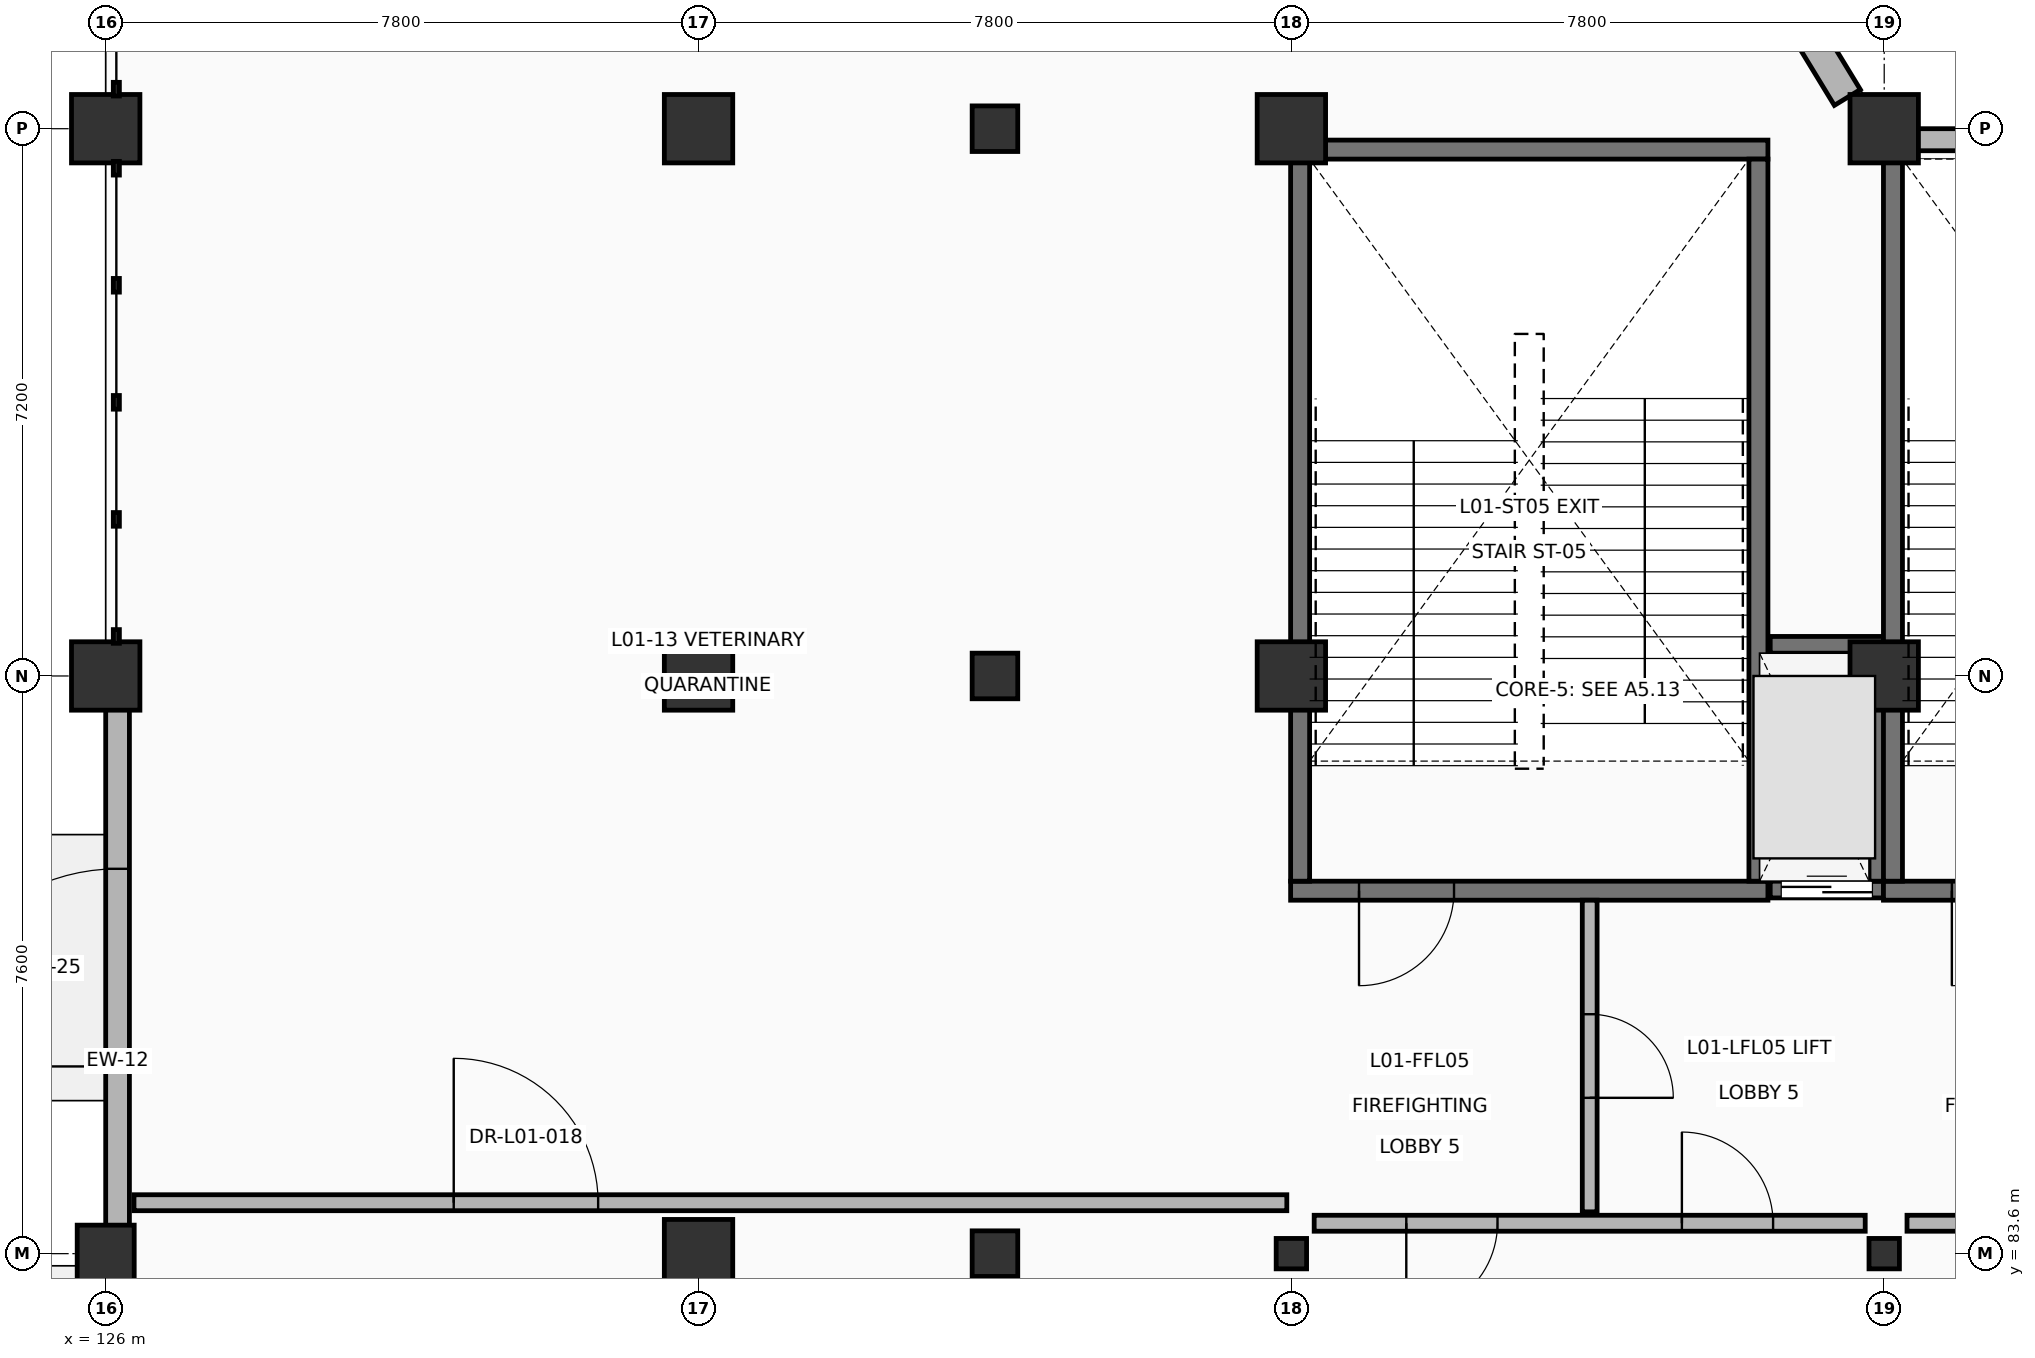
"""IFC4 building model, lengths in metres.
Left out: names, types, materials, properties, quantities, classifications, styles, units other than length and angle.
Written with IfcOpenShell. Run it as: python <this file> out.ifc"""

import sys

from ifc_helpers import new_model, si_unit, direction, frame, frame_2d, origin, origin_2d, place, context, subcontext, project, spatial, rectangle, hollow_rectangle, circle, extrude, element, fill, save


model = new_model("IFC4")
c1 = context("Model", 3, precision=1e-05, world=origin(), true_north=direction((0.0, 1.0)))
c2 = subcontext(c1, "Body", "Model", "MODEL_VIEW")
j1 = project(units=[si_unit("LENGTHUNIT", "METRE"), si_unit("PLANEANGLEUNIT", "RADIAN")], contexts=[c1])
p1 = place(None, origin())
s1 = spatial("IfcSite", under=j1, at=p1, CompositionType="ELEMENT")
p2 = place(p1, origin())
s2 = spatial("IfcBuilding", under=s1, at=p2, CompositionType="ELEMENT")
p3 = place(p2, origin())
s3 = spatial("IfcBuildingStorey", under=s2, at=p3, CompositionType="ELEMENT", Elevation=0.0)
p4 = place(p3, frame((126.0, 83.6, 0.0), z_axis=(0.0, 0.0, 1.0), x_axis=(1.0, 0.0, 0.0)))
e1 = element("IfcColumn", 1, at=p4, inside=s3, PredefinedType="COLUMN", context=c2, shape_type="SweptSolid", body=[
    extrude(circle(Radius=0.375, at=origin_2d()), origin(), (0.0, 0.0, 1.0), 5.1),
])
for number, where, z_axis, x_axis in (
    (2, (126.0, 91.2, 0.0), (0.0, 0.0, 1.0), (1.0, 0.0, 0.0)),
    (3, (126.0, 98.4, 0.0), (0.0, 0.0, 1.0), (1.0, 0.0, 0.0)),
):
    element("IfcColumn", number, at=place(p3, frame(where, z_axis=z_axis, x_axis=x_axis)), inside=s3, PredefinedType="COLUMN", context=c2, shape_type="SweptSolid", body=[
        extrude(rectangle(XDim=0.9, YDim=0.9, at=origin_2d()), origin(), (0.0, 0.0, 1.0), 5.1),
    ])
for number, where, z_axis, x_axis in (
    (4, (133.8, 83.6, 0.0), (0.0, 0.0, 1.0), (1.0, 0.0, 0.0)),
    (5, (133.8, 91.2, 0.0), (0.0, 0.0, 1.0), (1.0, 0.0, 0.0)),
    (6, (133.8, 98.4, 0.0), (0.0, 0.0, 1.0), (1.0, 0.0, 0.0)),
):
    element("IfcColumn", number, at=place(p3, frame(where, z_axis=z_axis, x_axis=x_axis)), inside=s3, PredefinedType="COLUMN", context=c2, shape_type="SweptSolid", body=[
        extrude(rectangle(XDim=0.9, YDim=0.9, at=origin_2d()), origin(), (0.0, 0.0, 1.0), 5.4),
    ])
p5 = place(p3, frame((141.6, 83.6, 0.0), z_axis=(0.0, 0.0, 1.0), x_axis=(1.0, 0.0, 0.0)))
e7 = element("IfcColumn", 7, at=p5, inside=s3, PredefinedType="COLUMN", context=c2, shape_type="SweptSolid", body=[
    extrude(hollow_rectangle(XDim=0.4, YDim=0.4, WallThickness=0.016, at=origin_2d()), origin(), (0.0, 0.0, 1.0), 5.4),
])
for number, where, z_axis, x_axis in (
    (8, (141.6, 91.2, 0.0), (0.0, 0.0, 1.0), (1.0, 0.0, 0.0)),
    (9, (141.6, 98.4, 0.0), (0.0, 0.0, 1.0), (1.0, 0.0, 0.0)),
):
    element("IfcColumn", number, at=place(p3, frame(where, z_axis=z_axis, x_axis=x_axis)), inside=s3, PredefinedType="COLUMN", context=c2, shape_type="SweptSolid", body=[
        extrude(rectangle(XDim=0.9, YDim=0.9, at=origin_2d()), origin(), (0.0, 0.0, 1.0), 5.4),
    ])
p6 = place(p3, frame((149.4, 83.6, 0.0), z_axis=(0.0, 0.0, 1.0), x_axis=(1.0, 0.0, 0.0)))
e10 = element("IfcColumn", 10, at=p6, inside=s3, PredefinedType="COLUMN", context=c2, shape_type="SweptSolid", body=[
    extrude(hollow_rectangle(XDim=0.4, YDim=0.4, WallThickness=0.016, at=origin_2d()), origin(), (0.0, 0.0, 1.0), 5.4),
])
for number, where, z_axis, x_axis in (
    (11, (149.4, 91.2, 0.0), (0.0, 0.0, 1.0), (1.0, 0.0, 0.0)),
    (12, (149.4, 98.4, 0.0), (0.0, 0.0, 1.0), (1.0, 0.0, 0.0)),
):
    element("IfcColumn", number, at=place(p3, frame(where, z_axis=z_axis, x_axis=x_axis)), inside=s3, PredefinedType="COLUMN", context=c2, shape_type="SweptSolid", body=[
        extrude(rectangle(XDim=0.9, YDim=0.9, at=origin_2d()), origin(), (0.0, 0.0, 1.0), 5.4),
    ])
for number, where, z_axis, x_axis in (
    (13, (137.7, 83.6, 0.0), (0.0, 0.0, 1.0), (1.0, 0.0, 0.0)),
    (14, (137.7, 91.2, 0.0), (0.0, 0.0, 1.0), (1.0, 0.0, 0.0)),
    (15, (137.7, 98.4, 0.0), (0.0, 0.0, 1.0), (1.0, 0.0, 0.0)),
):
    element("IfcColumn", number, at=place(p3, frame(where, z_axis=z_axis, x_axis=x_axis)), inside=s3, PredefinedType="COLUMN", context=c2, shape_type="SweptSolid", body=[
        extrude(rectangle(XDim=0.6, YDim=0.6, at=origin_2d()), origin(), (0.0, 0.0, 1.0), 5.4),
    ])
p7 = place(p3, frame((149.835, 98.255, 0.0), z_axis=(0.0, 0.0, 1.0), x_axis=(1.0, 0.0, 0.0)))
e16 = element("IfcWall", 16, at=p7, inside=s3, PredefinedType="SOLIDWALL", context=c2, shape_type="SweptSolid", body=[
    extrude(rectangle(XDim=6.93, YDim=0.29, at=frame_2d((3.465, 0.0))), origin(), (0.0, 0.0, 1.0), 4.325),
])
p8 = place(p3, frame((126.156, 83.96, 0.0), z_axis=(0.0, 0.0, 1.0), x_axis=(0.0, 1.0, 0.0)))
e17 = element("IfcWall", 17, at=p8, inside=s3, PredefinedType="SOLIDWALL", context=c2, shape_type="SweptSolid", body=[
    extrude(rectangle(XDim=6.805, YDim=0.312, at=frame_2d((3.402, 0.0))), origin(), (0.0, 0.0, 1.0), 4.402),
])
p9 = place(p8, frame((2.103, 0.0, 0.0)))
e18 = element("IfcOpeningElement", 18, at=p9, cuts=e17, PredefinedType="OPENING", context=c2, shape_type="SweptSolid", body=[
    extrude(rectangle(XDim=2.6, YDim=2.6, at=frame_2d((1.3, 1.3))), frame((0.0, 0.166, 0.0), z_axis=(0.0, -1.0, 0.0), x_axis=(1.0, 0.0, 0.0)), (0.0, 0.0, 1.0), 0.332),
])
p10 = place(p3, frame((145.319, 104.713, 0.0), z_axis=(0.0, 0.0, 1.0), x_axis=(0.520317846081, -0.853972680505, 0.0)))
e19 = element("IfcWall", 19, at=p10, inside=s3, PredefinedType="SOLIDWALL", context=c2, shape_type="SweptSolid", body=[
    extrude(rectangle(XDim=6.911, YDim=0.4, at=frame_2d((3.456, 0.0))), origin(), (0.0, 0.0, 1.0), 5.1),
])
p11 = place(p3, frame((141.59, 88.375, 0.0), z_axis=(0.0, 0.0, 1.0), x_axis=(1.0, 0.0, 0.0)))
e20 = element("IfcWall", 20, at=p11, inside=s3, PredefinedType="SHEAR", context=c2, shape_type="SweptSolid", body=[
    extrude(rectangle(XDim=6.28, YDim=0.25, at=frame_2d((3.14, 0.0))), origin(), (0.0, 0.0, 1.0), 5.1),
])
p12 = place(p11, frame((0.9, 0.0, 0.0)))
e21 = element("IfcOpeningElement", 21, at=p12, cuts=e20, PredefinedType="OPENING", context=c2, shape_type="SweptSolid", body=[
    extrude(rectangle(XDim=1.25, YDim=2.2, at=frame_2d((0.625, 1.1))), frame((0.0, 0.135, 0.0), z_axis=(0.0, -1.0, 0.0), x_axis=(1.0, 0.0, 0.0)), (0.0, 0.0, 1.0), 0.27),
])
p13 = place(p3, frame((141.59, 98.125, 0.0), z_axis=(0.0, 0.0, 1.0), x_axis=(1.0, 0.0, 0.0)))
e22 = element("IfcWall", 22, at=p13, inside=s3, PredefinedType="SHEAR", context=c2, shape_type="SweptSolid", body=[
    extrude(rectangle(XDim=6.28, YDim=0.25, at=frame_2d((3.14, 0.0))), origin(), (0.0, 0.0, 1.0), 5.1),
])
for number, where, z_axis, x_axis in (
    (23, (141.715, 88.5, 0.0), (0.0, 0.0, 1.0), (0.0, 1.0, 0.0)),
    (24, (147.745, 88.5, 0.0), (0.0, 0.0, 1.0), (0.0, 1.0, 0.0)),
):
    element("IfcWall", number, at=place(p3, frame(where, z_axis=z_axis, x_axis=x_axis)), inside=s3, PredefinedType="SHEAR", context=c2, shape_type="SweptSolid", body=[
        extrude(rectangle(XDim=9.5, YDim=0.25, at=frame_2d((4.75, 0.0))), origin(), (0.0, 0.0, 1.0), 5.1),
    ])
p14 = place(p3, frame((147.9, 88.39, 0.0), z_axis=(0.0, 0.0, 1.0), x_axis=(1.0, 0.0, 0.0)))
e25 = element("IfcWall", 25, at=p14, inside=s3, PredefinedType="SHEAR", context=c2, shape_type="SweptSolid", body=[
    extrude(rectangle(XDim=1.49, YDim=0.22, at=frame_2d((0.745, 0.0))), origin(), (0.0, 0.0, 1.0), 5.1),
])
p15 = place(p14, frame((0.145, 0.0, 0.0)))
e26 = element("IfcOpeningElement", 26, at=p15, cuts=e25, PredefinedType="OPENING", context=c2, shape_type="SweptSolid", body=[
    extrude(rectangle(XDim=1.2, YDim=2.2, at=frame_2d((0.6, 1.1))), frame((0.0, 0.12, 0.0), z_axis=(0.0, -1.0, 0.0), x_axis=(1.0, 0.0, 0.0)), (0.0, 0.0, 1.0), 0.24),
])
p16 = place(p3, frame((147.9, 91.61, 0.0), z_axis=(0.0, 0.0, 1.0), x_axis=(1.0, 0.0, 0.0)))
e27 = element("IfcWall", 27, at=p16, inside=s3, PredefinedType="SHEAR", context=c2, shape_type="SweptSolid", body=[
    extrude(rectangle(XDim=1.49, YDim=0.22, at=frame_2d((0.745, 0.0))), origin(), (0.0, 0.0, 1.0), 5.1),
])
p17 = place(p3, frame((149.31, 88.5, 0.0), z_axis=(0.0, 0.0, 1.0), x_axis=(0.0, 1.0, 0.0)))
e28 = element("IfcWall", 28, at=p17, inside=s3, PredefinedType="SHEAR", context=c2, shape_type="SweptSolid", body=[
    extrude(rectangle(XDim=3.0, YDim=0.22, at=frame_2d((1.5, 0.0))), origin(), (0.0, 0.0, 1.0), 5.1),
])
p18 = place(p3, frame((141.9, 84.0, 0.0), z_axis=(0.0, 0.0, 1.0), x_axis=(1.0, 0.0, 0.0)))
e29 = element("IfcWall", 29, at=p18, inside=s3, PredefinedType="PARTITIONING", context=c2, shape_type="SweptSolid", body=[
    extrude(rectangle(XDim=7.25, YDim=0.21, at=frame_2d((3.625, 0.0))), origin(), (0.0, 0.0, 1.0), 5.1),
])
p19 = place(p18, frame((1.212, 0.0, 0.0)))
e30 = element("IfcOpeningElement", 30, at=p19, cuts=e29, PredefinedType="OPENING", context=c2, shape_type="SweptSolid", body=[
    extrude(rectangle(XDim=1.2, YDim=2.2, at=frame_2d((0.6, 1.1))), frame((0.0, 0.115, 0.0), z_axis=(0.0, -1.0, 0.0), x_axis=(1.0, 0.0, 0.0)), (0.0, 0.0, 1.0), 0.23),
])
p20 = place(p18, frame((4.838, 0.0, 0.0)))
e31 = element("IfcOpeningElement", 31, at=p20, cuts=e29, PredefinedType="OPENING", context=c2, shape_type="SweptSolid", body=[
    extrude(rectangle(XDim=1.2, YDim=2.2, at=frame_2d((0.6, 1.1))), frame((0.0, 0.115, 0.0), z_axis=(0.0, -1.0, 0.0), x_axis=(1.0, 0.0, 0.0)), (0.0, 0.0, 1.0), 0.23),
])
p21 = place(p3, frame((145.525, 84.15, 0.0), z_axis=(0.0, 0.0, 1.0), x_axis=(0.0, 1.0, 0.0)))
e32 = element("IfcWall", 32, at=p21, inside=s3, PredefinedType="PARTITIONING", context=c2, shape_type="SweptSolid", body=[
    extrude(rectangle(XDim=4.1, YDim=0.195, at=frame_2d((2.05, 0.0))), origin(), (0.0, 0.0, 1.0), 5.1),
])
p22 = place(p21, frame((1.5, 0.0, 0.0)))
e33 = element("IfcOpeningElement", 33, at=p22, cuts=e32, PredefinedType="OPENING", context=c2, shape_type="SweptSolid", body=[
    extrude(rectangle(XDim=1.1, YDim=2.15, at=frame_2d((0.55, 1.075))), frame((0.0, 0.107, 0.0), z_axis=(0.0, -1.0, 0.0), x_axis=(1.0, 0.0, 0.0)), (0.0, 0.0, 1.0), 0.215),
])
p23 = place(p3, frame((149.39, 88.375, 0.0), z_axis=(0.0, 0.0, 1.0), x_axis=(1.0, 0.0, 0.0)))
e34 = element("IfcWall", 34, at=p23, inside=s3, PredefinedType="SHEAR", context=c2, shape_type="SweptSolid", body=[
    extrude(rectangle(XDim=6.28, YDim=0.25, at=frame_2d((3.14, 0.0))), origin(), (0.0, 0.0, 1.0), 5.1),
])
p24 = place(p23, frame((0.9, 0.0, 0.0)))
e35 = element("IfcOpeningElement", 35, at=p24, cuts=e34, PredefinedType="OPENING", context=c2, shape_type="SweptSolid", body=[
    extrude(rectangle(XDim=1.25, YDim=2.2, at=frame_2d((0.625, 1.1))), frame((0.0, 0.135, 0.0), z_axis=(0.0, -1.0, 0.0), x_axis=(1.0, 0.0, 0.0)), (0.0, 0.0, 1.0), 0.27),
])
p25 = place(p3, frame((149.515, 88.5, 0.0), z_axis=(0.0, 0.0, 1.0), x_axis=(0.0, 1.0, 0.0)))
e36 = element("IfcWall", 36, at=p25, inside=s3, PredefinedType="SHEAR", context=c2, shape_type="SweptSolid", body=[
    extrude(rectangle(XDim=9.5, YDim=0.25, at=frame_2d((4.75, 0.0))), origin(), (0.0, 0.0, 1.0), 5.1),
])
p26 = place(p3, frame((149.7, 84.0, 0.0), z_axis=(0.0, 0.0, 1.0), x_axis=(1.0, 0.0, 0.0)))
e37 = element("IfcWall", 37, at=p26, inside=s3, PredefinedType="PARTITIONING", context=c2, shape_type="SweptSolid", body=[
    extrude(rectangle(XDim=7.25, YDim=0.21, at=frame_2d((3.625, 0.0))), origin(), (0.0, 0.0, 1.0), 5.1),
])
p27 = place(p26, frame((1.212, 0.0, 0.0)))
e38 = element("IfcOpeningElement", 38, at=p27, cuts=e37, PredefinedType="OPENING", context=c2, shape_type="SweptSolid", body=[
    extrude(rectangle(XDim=1.2, YDim=2.2, at=frame_2d((0.6, 1.1))), frame((0.0, 0.115, 0.0), z_axis=(0.0, -1.0, 0.0), x_axis=(1.0, 0.0, 0.0)), (0.0, 0.0, 1.0), 0.23),
])
p28 = place(p26, frame((4.838, 0.0, 0.0)))
e39 = element("IfcOpeningElement", 39, at=p28, cuts=e37, PredefinedType="OPENING", context=c2, shape_type="SweptSolid", body=[
    extrude(rectangle(XDim=1.2, YDim=2.2, at=frame_2d((0.6, 1.1))), frame((0.0, 0.115, 0.0), z_axis=(0.0, -1.0, 0.0), x_axis=(1.0, 0.0, 0.0)), (0.0, 0.0, 1.0), 0.23),
])
p29 = place(p3, frame((126.372, 84.27, 0.0), z_axis=(0.0, 0.0, 1.0), x_axis=(1.0, 0.0, 0.0)))
e40 = element("IfcWall", 40, at=p29, inside=s3, PredefinedType="PARTITIONING", context=c2, shape_type="SweptSolid", body=[
    extrude(rectangle(XDim=15.168, YDim=0.21, at=frame_2d((7.584, 0.0))), origin(), (0.0, 0.0, 1.0), 4.402),
])
p30 = place(p29, frame((4.207, 0.0, 0.0)))
e41 = element("IfcOpeningElement", 41, at=p30, cuts=e40, PredefinedType="OPENING", context=c2, shape_type="SweptSolid", body=[
    extrude(rectangle(XDim=1.9, YDim=2.4, at=frame_2d((0.95, 1.2))), frame((0.0, 0.115, 0.0), z_axis=(0.0, -1.0, 0.0), x_axis=(1.0, 0.0, 0.0)), (0.0, 0.0, 1.0), 0.23),
])
p31 = place(p9, origin())
e42 = element("IfcDoor", 42, at=p31, inside=s3, OperationType="DOUBLE_DOOR_SINGLE_SWING", PredefinedType="DOOR", context=c2, shape_type="SweptSolid", body=[
    extrude(rectangle(XDim=2.6, YDim=2.6, at=frame_2d((1.3, 1.3))), frame((0.0, 0.025, 0.0), z_axis=(0.0, -1.0, 0.0), x_axis=(1.0, 0.0, 0.0)), (0.0, 0.0, 1.0), 0.05),
])
fill(e18, e42)
p32 = place(p12, origin())
e43 = element("IfcDoor", 43, at=p32, inside=s3, OperationType="SINGLE_SWING_RIGHT", PredefinedType="DOOR", context=c2, shape_type="SweptSolid", body=[
    extrude(rectangle(XDim=1.25, YDim=2.2, at=frame_2d((0.625, 1.1))), frame((0.0, 0.025, 0.0), z_axis=(0.0, -1.0, 0.0), x_axis=(1.0, 0.0, 0.0)), (0.0, 0.0, 1.0), 0.05),
])
fill(e21, e43)
p33 = place(p15, origin())
e44 = element("IfcDoor", 44, at=p33, inside=s3, OperationType="DOUBLE_DOOR_SLIDING", PredefinedType="DOOR", context=c2, shape_type="SweptSolid", body=[
    extrude(rectangle(XDim=1.2, YDim=2.2, at=frame_2d((0.6, 1.1))), frame((0.0, 0.025, 0.0), z_axis=(0.0, -1.0, 0.0), x_axis=(1.0, 0.0, 0.0)), (0.0, 0.0, 1.0), 0.05),
])
fill(e26, e44)
p34 = place(p19, origin())
e45 = element("IfcDoor", 45, at=p34, inside=s3, OperationType="SINGLE_SWING_RIGHT", PredefinedType="DOOR", context=c2, shape_type="SweptSolid", body=[
    extrude(rectangle(XDim=1.2, YDim=2.2, at=frame_2d((0.6, 1.1))), frame((0.0, 0.025, 0.0), z_axis=(0.0, -1.0, 0.0), x_axis=(1.0, 0.0, 0.0)), (0.0, 0.0, 1.0), 0.05),
])
fill(e30, e45)
p35 = place(p20, origin())
e46 = element("IfcDoor", 46, at=p35, inside=s3, OperationType="SINGLE_SWING_LEFT", PredefinedType="DOOR", context=c2, shape_type="SweptSolid", body=[
    extrude(rectangle(XDim=1.2, YDim=2.2, at=frame_2d((0.6, 1.1))), frame((0.0, 0.025, 0.0), z_axis=(0.0, -1.0, 0.0), x_axis=(1.0, 0.0, 0.0)), (0.0, 0.0, 1.0), 0.05),
])
fill(e31, e46)
p36 = place(p22, origin())
e47 = element("IfcDoor", 47, at=p36, inside=s3, OperationType="SINGLE_SWING_RIGHT", PredefinedType="DOOR", context=c2, shape_type="SweptSolid", body=[
    extrude(rectangle(XDim=1.1, YDim=2.15, at=frame_2d((0.55, 1.075))), frame((0.0, 0.025, 0.0), z_axis=(0.0, -1.0, 0.0), x_axis=(1.0, 0.0, 0.0)), (0.0, 0.0, 1.0), 0.05),
])
fill(e33, e47)
p37 = place(p24, origin())
e48 = element("IfcDoor", 48, at=p37, inside=s3, OperationType="SINGLE_SWING_RIGHT", PredefinedType="DOOR", context=c2, shape_type="SweptSolid", body=[
    extrude(rectangle(XDim=1.25, YDim=2.2, at=frame_2d((0.625, 1.1))), frame((0.0, 0.025, 0.0), z_axis=(0.0, -1.0, 0.0), x_axis=(1.0, 0.0, 0.0)), (0.0, 0.0, 1.0), 0.05),
])
fill(e35, e48)
p38 = place(p30, origin())
e49 = element("IfcDoor", 49, at=p38, inside=s3, OperationType="DOUBLE_DOOR_SINGLE_SWING", PredefinedType="DOOR", context=c2, shape_type="SweptSolid", body=[
    extrude(rectangle(XDim=1.9, YDim=2.4, at=frame_2d((0.95, 1.2))), frame((0.0, 0.025, 0.0), z_axis=(0.0, -1.0, 0.0), x_axis=(1.0, 0.0, 0.0)), (0.0, 0.0, 1.0), 0.05),
])
fill(e41, e49)
save(model, sys.argv[1])
